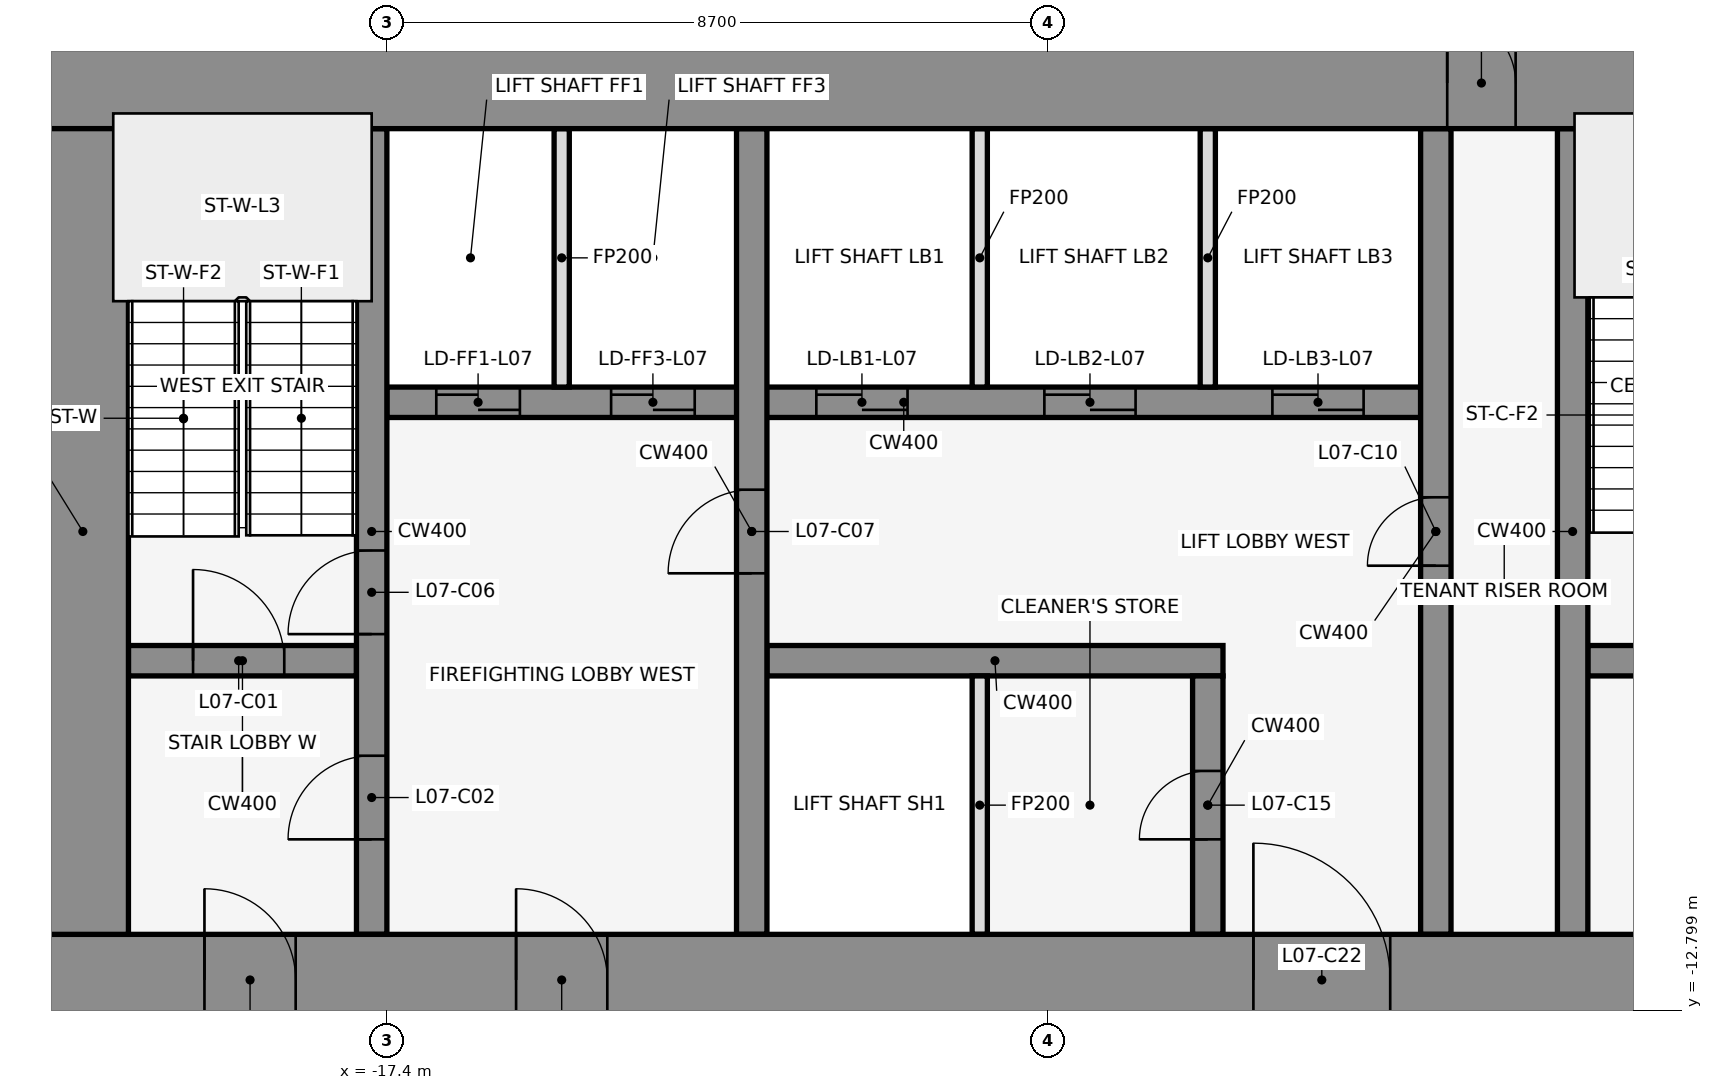
"""IFC4 building model, lengths in metres.
Left out: names, types, materials, properties, quantities, classifications, styles, units other than length and angle.
Written with IfcOpenShell. Run it as: python <this file> out.ifc"""

import sys

from ifc_helpers import new_model, si_unit, direction, frame, frame_2d, origin, place, context, subcontext, project, spatial, rectangle, extrude, element, fill, save


model = new_model("IFC4")
c1 = context("Model", 3, precision=1e-05, world=origin(), true_north=direction((0.0, 1.0)))
c2 = subcontext(c1, "Body", "Model", "MODEL_VIEW")
j1 = project(units=[si_unit("LENGTHUNIT", "METRE"), si_unit("PLANEANGLEUNIT", "RADIAN")], contexts=[c1])
p1 = place(None, origin())
s1 = spatial("IfcSite", under=j1, at=p1, CompositionType="ELEMENT")
p2 = place(p1, origin())
s2 = spatial("IfcBuilding", under=s1, at=p2, CompositionType="ELEMENT")
p3 = place(p2, frame((0.0, 0.0, 39.5)))
s3 = spatial("IfcBuildingStorey", under=s2, at=p3, CompositionType="ELEMENT", Elevation=39.5)
for number, where, z_axis, x_axis in (
    (1, (-0.068, -0.105, 0.0), (0.0, 0.0, 1.0), (-0.84, 0.543, 0.0)),
    (2, (-14.599, 1.08, 0.0), (0.0, 0.0, 1.0), (-0.84, -0.543, 0.0)),
):
    element("IfcWall", number, at=place(p3, frame(where, z_axis=z_axis, x_axis=x_axis)), inside=s3, PredefinedType="STANDARD", context=c2, shape_type="SweptSolid", body=[
        extrude(rectangle(XDim=2.183, YDim=0.25, at=frame_2d((1.091, 0.0))), origin(), (0.0, 0.0, 1.0), 4.35),
    ])
p4 = place(p3, frame((-20.8, -8.2, 0.0), z_axis=(0.0, 0.0, 1.0), x_axis=(1.0, 0.0, 0.0)))
e3 = element("IfcWall", 3, at=p4, inside=s3, PredefinedType="SHEAR", context=c2, shape_type="SweptSolid", body=[
    extrude(rectangle(XDim=3.0, YDim=0.4, at=frame_2d((1.5, 0.0))), origin(), (0.0, 0.0, 1.0), 4.5),
])
p5 = place(p4, frame((0.85, 0.0, 0.0)))
e4 = element("IfcOpeningElement", 4, at=p5, cuts=e3, PredefinedType="OPENING", context=c2, shape_type="SweptSolid", body=[
    extrude(rectangle(XDim=1.2, YDim=2.1, at=frame_2d((0.6, 1.05))), frame((0.0, 0.212, 0.0), z_axis=(0.0, -1.0, 0.0), x_axis=(1.0, 0.0, 0.0)), (0.0, 0.0, 1.0), 0.424),
])
p6 = place(p3, frame((-12.4, -8.2, 0.0), z_axis=(0.0, 0.0, 1.0), x_axis=(1.0, 0.0, 0.0)))
e5 = element("IfcWall", 5, at=p6, inside=s3, PredefinedType="SHEAR", context=c2, shape_type="SweptSolid", body=[
    extrude(rectangle(XDim=6.0, YDim=0.4, at=frame_2d((3.0, 0.0))), origin(), (0.0, 0.0, 1.0), 4.5),
])
p7 = place(p3, frame((-1.6, -8.2, 0.0), z_axis=(0.0, 0.0, 1.0), x_axis=(1.0, 0.0, 0.0)))
e6 = element("IfcWall", 6, at=p7, inside=s3, PredefinedType="SHEAR", context=c2, shape_type="SweptSolid", body=[
    extrude(rectangle(XDim=3.2, YDim=0.4, at=frame_2d((1.6, 0.0))), origin(), (0.0, 0.0, 1.0), 4.5),
])
p8 = place(p7, frame((1.05, 0.0, 0.0)))
e7 = element("IfcOpeningElement", 7, at=p8, cuts=e6, PredefinedType="OPENING", context=c2, shape_type="SweptSolid", body=[
    extrude(rectangle(XDim=1.2, YDim=2.1, at=frame_2d((0.6, 1.05))), frame((0.0, 0.212, 0.0), z_axis=(0.0, -1.0, 0.0), x_axis=(1.0, 0.0, 0.0)), (0.0, 0.0, 1.0), 0.424),
])
p9 = place(p3, frame((-17.4, -4.8, 0.0), z_axis=(0.0, 0.0, 1.0), x_axis=(1.0, 0.0, 0.0)))
e8 = element("IfcWall", 8, at=p9, inside=s3, PredefinedType="SHEAR", context=c2, shape_type="SweptSolid", body=[
    extrude(rectangle(XDim=13.6, YDim=0.4, at=frame_2d((6.8, 0.0))), origin(), (0.0, 0.0, 1.0), 4.5),
])
p10 = place(p9, frame((0.65, 0.0, 0.0)))
e9 = element("IfcOpeningElement", 9, at=p10, cuts=e8, PredefinedType="OPENING", context=c2, shape_type="SweptSolid", body=[
    extrude(rectangle(XDim=1.1, YDim=2.1, at=frame_2d((0.55, 1.05))), frame((0.0, 0.212, 0.0), z_axis=(0.0, -1.0, 0.0), x_axis=(1.0, 0.0, 0.0)), (0.0, 0.0, 1.0), 0.424),
])
p11 = place(p9, frame((2.95, 0.0, 0.0)))
e10 = element("IfcOpeningElement", 10, at=p11, cuts=e8, PredefinedType="OPENING", context=c2, shape_type="SweptSolid", body=[
    extrude(rectangle(XDim=1.1, YDim=2.1, at=frame_2d((0.55, 1.05))), frame((0.0, 0.212, 0.0), z_axis=(0.0, -1.0, 0.0), x_axis=(1.0, 0.0, 0.0)), (0.0, 0.0, 1.0), 0.424),
])
p12 = place(p9, frame((5.65, 0.0, 0.0)))
e11 = element("IfcOpeningElement", 11, at=p12, cuts=e8, PredefinedType="OPENING", context=c2, shape_type="SweptSolid", body=[
    extrude(rectangle(XDim=1.2, YDim=2.1, at=frame_2d((0.6, 1.05))), frame((0.0, 0.212, 0.0), z_axis=(0.0, -1.0, 0.0), x_axis=(1.0, 0.0, 0.0)), (0.0, 0.0, 1.0), 0.424),
])
p13 = place(p9, frame((8.65, 0.0, 0.0)))
e12 = element("IfcOpeningElement", 12, at=p13, cuts=e8, PredefinedType="OPENING", context=c2, shape_type="SweptSolid", body=[
    extrude(rectangle(XDim=1.2, YDim=2.1, at=frame_2d((0.6, 1.05))), frame((0.0, 0.212, 0.0), z_axis=(0.0, -1.0, 0.0), x_axis=(1.0, 0.0, 0.0)), (0.0, 0.0, 1.0), 0.424),
])
p14 = place(p9, frame((11.65, 0.0, 0.0)))
e13 = element("IfcOpeningElement", 13, at=p14, cuts=e8, PredefinedType="OPENING", context=c2, shape_type="SweptSolid", body=[
    extrude(rectangle(XDim=1.2, YDim=2.1, at=frame_2d((0.6, 1.05))), frame((0.0, 0.212, 0.0), z_axis=(0.0, -1.0, 0.0), x_axis=(1.0, 0.0, 0.0)), (0.0, 0.0, 1.0), 0.424),
])
p15 = place(p3, frame((-17.6, -11.8, 0.0), z_axis=(0.0, 0.0, 1.0), x_axis=(0.0, 1.0, 0.0)))
e14 = element("IfcWall", 14, at=p15, inside=s3, PredefinedType="SHEAR", context=c2, shape_type="SweptSolid", body=[
    extrude(rectangle(XDim=10.6, YDim=0.4, at=frame_2d((5.3, 0.0))), origin(), (0.0, 0.0, 1.0), 4.5),
])
p16 = place(p15, frame((1.25, 0.0, 0.0)))
e15 = element("IfcOpeningElement", 15, at=p16, cuts=e14, PredefinedType="OPENING", context=c2, shape_type="SweptSolid", body=[
    extrude(rectangle(XDim=1.1, YDim=2.1, at=frame_2d((0.55, 1.05))), frame((0.0, 0.212, 0.0), z_axis=(0.0, -1.0, 0.0), x_axis=(1.0, 0.0, 0.0)), (0.0, 0.0, 1.0), 0.424),
])
p17 = place(p15, frame((3.95, 0.0, 0.0)))
e16 = element("IfcOpeningElement", 16, at=p17, cuts=e14, PredefinedType="OPENING", context=c2, shape_type="SweptSolid", body=[
    extrude(rectangle(XDim=1.1, YDim=2.1, at=frame_2d((0.55, 1.05))), frame((0.0, 0.212, 0.0), z_axis=(0.0, -1.0, 0.0), x_axis=(1.0, 0.0, 0.0)), (0.0, 0.0, 1.0), 0.424),
])
p18 = place(p3, frame((-15.1, -4.6, 0.0), z_axis=(0.0, 0.0, 1.0), x_axis=(0.0, 1.0, 0.0)))
e17 = element("IfcWall", 17, at=p18, inside=s3, PredefinedType="PARTITIONING", context=c2, shape_type="SweptSolid", body=[
    extrude(rectangle(XDim=3.4, YDim=0.2, at=frame_2d((1.7, 0.0))), origin(), (0.0, 0.0, 1.0), 3.418),
])
p19 = place(p3, frame((-12.6, -11.8, 0.0), z_axis=(0.0, 0.0, 1.0), x_axis=(0.0, 1.0, 0.0)))
e18 = element("IfcWall", 18, at=p19, inside=s3, PredefinedType="SHEAR", context=c2, shape_type="SweptSolid", body=[
    extrude(rectangle(XDim=10.6, YDim=0.4, at=frame_2d((5.3, 0.0))), origin(), (0.0, 0.0, 1.0), 4.5),
])
p20 = place(p19, frame((4.75, 0.0, 0.0)))
e19 = element("IfcOpeningElement", 19, at=p20, cuts=e18, PredefinedType="OPENING", context=c2, shape_type="SweptSolid", body=[
    extrude(rectangle(XDim=1.1, YDim=2.1, at=frame_2d((0.55, 1.05))), frame((0.0, 0.212, 0.0), z_axis=(0.0, -1.0, 0.0), x_axis=(1.0, 0.0, 0.0)), (0.0, 0.0, 1.0), 0.424),
])
for number, where, z_axis, x_axis in (
    (20, (-9.6, -11.8, 0.0), (0.0, 0.0, 1.0), (0.0, 1.0, 0.0)),
    (21, (-9.6, -4.6, 0.0), (0.0, 0.0, 1.0), (0.0, 1.0, 0.0)),
):
    element("IfcWall", number, at=place(p3, frame(where, z_axis=z_axis, x_axis=x_axis)), inside=s3, PredefinedType="PARTITIONING", context=c2, shape_type="SweptSolid", body=[
        extrude(rectangle(XDim=3.4, YDim=0.2, at=frame_2d((1.7, 0.0))), origin(), (0.0, 0.0, 1.0), 3.418),
    ])
p21 = place(p3, frame((-6.6, -11.8, 0.0), z_axis=(0.0, 0.0, 1.0), x_axis=(0.0, 1.0, 0.0)))
e22 = element("IfcWall", 22, at=p21, inside=s3, PredefinedType="SHEAR", context=c2, shape_type="SweptSolid", body=[
    extrude(rectangle(XDim=3.4, YDim=0.4, at=frame_2d((1.7, 0.0))), origin(), (0.0, 0.0, 1.0), 4.5),
])
p22 = place(p21, frame((1.25, 0.0, 0.0)))
e23 = element("IfcOpeningElement", 23, at=p22, cuts=e22, PredefinedType="OPENING", context=c2, shape_type="SweptSolid", body=[
    extrude(rectangle(XDim=0.9, YDim=2.1, at=frame_2d((0.45, 1.05))), frame((0.0, 0.212, 0.0), z_axis=(0.0, -1.0, 0.0), x_axis=(1.0, 0.0, 0.0)), (0.0, 0.0, 1.0), 0.424),
])
p23 = place(p3, frame((-6.6, -4.6, 0.0), z_axis=(0.0, 0.0, 1.0), x_axis=(0.0, 1.0, 0.0)))
e24 = element("IfcWall", 24, at=p23, inside=s3, PredefinedType="PARTITIONING", context=c2, shape_type="SweptSolid", body=[
    extrude(rectangle(XDim=3.4, YDim=0.2, at=frame_2d((1.7, 0.0))), origin(), (0.0, 0.0, 1.0), 3.418),
])
p24 = place(p3, frame((-3.6, -11.8, 0.0), z_axis=(0.0, 0.0, 1.0), x_axis=(0.0, 1.0, 0.0)))
e25 = element("IfcWall", 25, at=p24, inside=s3, PredefinedType="SHEAR", context=c2, shape_type="SweptSolid", body=[
    extrude(rectangle(XDim=10.6, YDim=0.4, at=frame_2d((5.3, 0.0))), origin(), (0.0, 0.0, 1.0), 4.5),
])
p25 = place(p24, frame((4.85, 0.0, 0.0)))
e26 = element("IfcOpeningElement", 26, at=p25, cuts=e25, PredefinedType="OPENING", context=c2, shape_type="SweptSolid", body=[
    extrude(rectangle(XDim=0.9, YDim=2.1, at=frame_2d((0.45, 1.05))), frame((0.0, 0.212, 0.0), z_axis=(0.0, -1.0, 0.0), x_axis=(1.0, 0.0, 0.0)), (0.0, 0.0, 1.0), 0.424),
])
p26 = place(p3, frame((-1.8, -11.8, 0.0), z_axis=(0.0, 0.0, 1.0), x_axis=(0.0, 1.0, 0.0)))
e27 = element("IfcWall", 27, at=p26, inside=s3, PredefinedType="SHEAR", context=c2, shape_type="SweptSolid", body=[
    extrude(rectangle(XDim=10.6, YDim=0.4, at=frame_2d((5.3, 0.0))), origin(), (0.0, 0.0, 1.0), 4.5),
])
p27 = place(p3, frame((-22.0, -0.6, 0.0), z_axis=(0.0, 0.0, 1.0), x_axis=(1.0, 0.0, 0.0)))
e28 = element("IfcWall", 28, at=p27, inside=s3, PredefinedType="SHEAR", context=c2, shape_type="SweptSolid", body=[
    extrude(rectangle(XDim=44.0, YDim=1.2, at=frame_2d((22.0, 0.0))), origin(), (0.0, 0.0, 1.0), 4.5),
])
p28 = place(p27, frame((18.55, 0.0, 0.0)))
e29 = element("IfcOpeningElement", 29, at=p28, cuts=e28, PredefinedType="OPENING", context=c2, shape_type="SweptSolid", body=[
    extrude(rectangle(XDim=0.9, YDim=2.1, at=frame_2d((0.45, 1.05))), frame((0.0, 0.612, 0.0), z_axis=(0.0, -1.0, 0.0), x_axis=(1.0, 0.0, 0.0)), (0.0, 0.0, 1.0), 1.224),
])
p29 = place(p27, frame((24.55, 0.0, 0.0)))
e30 = element("IfcOpeningElement", 30, at=p29, cuts=e28, PredefinedType="OPENING", context=c2, shape_type="SweptSolid", body=[
    extrude(rectangle(XDim=0.9, YDim=2.1, at=frame_2d((0.45, 1.05))), frame((0.0, 0.612, 0.0), z_axis=(0.0, -1.0, 0.0), x_axis=(1.0, 0.0, 0.0)), (0.0, 0.0, 1.0), 1.224),
])
p30 = place(p3, frame((-22.0, -12.4, 0.0), z_axis=(0.0, 0.0, 1.0), x_axis=(1.0, 0.0, 0.0)))
e31 = element("IfcWall", 31, at=p30, inside=s3, PredefinedType="SHEAR", context=c2, shape_type="SweptSolid", body=[
    extrude(rectangle(XDim=44.0, YDim=1.2, at=frame_2d((22.0, 0.0))), origin(), (0.0, 0.0, 1.0), 4.5),
])
p31 = place(p30, frame((2.2, 0.0, 0.0)))
e32 = element("IfcOpeningElement", 32, at=p31, cuts=e31, PredefinedType="OPENING", context=c2, shape_type="SweptSolid", body=[
    extrude(rectangle(XDim=1.2, YDim=2.1, at=frame_2d((0.6, 1.05))), frame((0.0, 0.612, 0.0), z_axis=(0.0, -1.0, 0.0), x_axis=(1.0, 0.0, 0.0)), (0.0, 0.0, 1.0), 1.224),
])
p32 = place(p30, frame((21.4, 0.0, 0.0)))
e33 = element("IfcOpeningElement", 33, at=p32, cuts=e31, PredefinedType="OPENING", context=c2, shape_type="SweptSolid", body=[
    extrude(rectangle(XDim=1.2, YDim=2.1, at=frame_2d((0.6, 1.05))), frame((0.0, 0.612, 0.0), z_axis=(0.0, -1.0, 0.0), x_axis=(1.0, 0.0, 0.0)), (0.0, 0.0, 1.0), 1.224),
])
p33 = place(p30, frame((40.6, 0.0, 0.0)))
e34 = element("IfcOpeningElement", 34, at=p33, cuts=e31, PredefinedType="OPENING", context=c2, shape_type="SweptSolid", body=[
    extrude(rectangle(XDim=1.2, YDim=2.1, at=frame_2d((0.6, 1.05))), frame((0.0, 0.612, 0.0), z_axis=(0.0, -1.0, 0.0), x_axis=(1.0, 0.0, 0.0)), (0.0, 0.0, 1.0), 1.224),
])
p34 = place(p30, frame((16.0, 0.0, 0.0)))
e35 = element("IfcOpeningElement", 35, at=p34, cuts=e31, PredefinedType="OPENING", context=c2, shape_type="SweptSolid", body=[
    extrude(rectangle(XDim=1.8, YDim=2.1, at=frame_2d((0.9, 1.05))), frame((0.0, 0.612, 0.0), z_axis=(0.0, -1.0, 0.0), x_axis=(1.0, 0.0, 0.0)), (0.0, 0.0, 1.0), 1.224),
])
p35 = place(p30, frame((6.3, 0.0, 0.0)))
e36 = element("IfcOpeningElement", 36, at=p35, cuts=e31, PredefinedType="OPENING", context=c2, shape_type="SweptSolid", body=[
    extrude(rectangle(XDim=1.2, YDim=2.1, at=frame_2d((0.6, 1.05))), frame((0.0, 0.612, 0.0), z_axis=(0.0, -1.0, 0.0), x_axis=(1.0, 0.0, 0.0)), (0.0, 0.0, 1.0), 1.224),
])
p36 = place(p30, frame((26.2, 0.0, 0.0)))
e37 = element("IfcOpeningElement", 37, at=p36, cuts=e31, PredefinedType="OPENING", context=c2, shape_type="SweptSolid", body=[
    extrude(rectangle(XDim=1.8, YDim=2.1, at=frame_2d((0.9, 1.05))), frame((0.0, 0.612, 0.0), z_axis=(0.0, -1.0, 0.0), x_axis=(1.0, 0.0, 0.0)), (0.0, 0.0, 1.0), 1.224),
])
p37 = place(p30, frame((36.5, 0.0, 0.0)))
e38 = element("IfcOpeningElement", 38, at=p37, cuts=e31, PredefinedType="OPENING", context=c2, shape_type="SweptSolid", body=[
    extrude(rectangle(XDim=1.2, YDim=2.1, at=frame_2d((0.6, 1.05))), frame((0.0, 0.612, 0.0), z_axis=(0.0, -1.0, 0.0), x_axis=(1.0, 0.0, 0.0)), (0.0, 0.0, 1.0), 1.224),
])
p38 = place(p3, frame((-21.4, -11.8, 0.0), z_axis=(0.0, 0.0, 1.0), x_axis=(0.0, 1.0, 0.0)))
e39 = element("IfcWall", 39, at=p38, inside=s3, PredefinedType="SHEAR", context=c2, shape_type="SweptSolid", body=[
    extrude(rectangle(XDim=10.6, YDim=1.2, at=frame_2d((5.3, 0.0))), origin(), (0.0, 0.0, 1.0), 4.5),
])
p39 = place(p5, origin())
e40 = element("IfcDoor", 40, at=p39, inside=s3, OperationType="SINGLE_SWING_LEFT", PredefinedType="DOOR", context=c2, shape_type="SweptSolid", body=[
    extrude(rectangle(XDim=1.2, YDim=2.1, at=frame_2d((0.6, 1.05))), frame((0.0, 0.025, 0.0), z_axis=(0.0, -1.0, 0.0), x_axis=(1.0, 0.0, 0.0)), (0.0, 0.0, 1.0), 0.05),
])
fill(e4, e40)
p40 = place(p16, frame((1.1, 0.0, 0.0), z_axis=(0.0, 0.0, 1.0), x_axis=(-1.0, 0.0, 0.0)))
e41 = element("IfcDoor", 41, at=p40, inside=s3, OperationType="SINGLE_SWING_LEFT", PredefinedType="DOOR", context=c2, shape_type="SweptSolid", body=[
    extrude(rectangle(XDim=1.1, YDim=2.1, at=frame_2d((0.55, 1.05))), frame((0.0, 0.025, 0.0), z_axis=(0.0, -1.0, 0.0), x_axis=(1.0, 0.0, 0.0)), (0.0, 0.0, 1.0), 0.05),
])
fill(e15, e41)
p41 = place(p10, origin())
e42 = element("IfcDoor", 42, at=p41, inside=s3, OperationType="DOUBLE_DOOR_SLIDING", PredefinedType="DOOR", context=c2, shape_type="SweptSolid", body=[
    extrude(rectangle(XDim=1.1, YDim=2.1, at=frame_2d((0.55, 1.05))), frame((0.0, 0.025, 0.0), z_axis=(0.0, -1.0, 0.0), x_axis=(1.0, 0.0, 0.0)), (0.0, 0.0, 1.0), 0.05),
])
fill(e9, e42)
p42 = place(p11, origin())
e43 = element("IfcDoor", 43, at=p42, inside=s3, OperationType="DOUBLE_DOOR_SLIDING", PredefinedType="DOOR", context=c2, shape_type="SweptSolid", body=[
    extrude(rectangle(XDim=1.1, YDim=2.1, at=frame_2d((0.55, 1.05))), frame((0.0, 0.025, 0.0), z_axis=(0.0, -1.0, 0.0), x_axis=(1.0, 0.0, 0.0)), (0.0, 0.0, 1.0), 0.05),
])
fill(e10, e43)
p43 = place(p12, origin())
e44 = element("IfcDoor", 44, at=p43, inside=s3, OperationType="DOUBLE_DOOR_SLIDING", PredefinedType="DOOR", context=c2, shape_type="SweptSolid", body=[
    extrude(rectangle(XDim=1.2, YDim=2.1, at=frame_2d((0.6, 1.05))), frame((0.0, 0.025, 0.0), z_axis=(0.0, -1.0, 0.0), x_axis=(1.0, 0.0, 0.0)), (0.0, 0.0, 1.0), 0.05),
])
fill(e11, e44)
p44 = place(p13, origin())
e45 = element("IfcDoor", 45, at=p44, inside=s3, OperationType="DOUBLE_DOOR_SLIDING", PredefinedType="DOOR", context=c2, shape_type="SweptSolid", body=[
    extrude(rectangle(XDim=1.2, YDim=2.1, at=frame_2d((0.6, 1.05))), frame((0.0, 0.025, 0.0), z_axis=(0.0, -1.0, 0.0), x_axis=(1.0, 0.0, 0.0)), (0.0, 0.0, 1.0), 0.05),
])
fill(e12, e45)
p45 = place(p14, origin())
e46 = element("IfcDoor", 46, at=p45, inside=s3, OperationType="DOUBLE_DOOR_SLIDING", PredefinedType="DOOR", context=c2, shape_type="SweptSolid", body=[
    extrude(rectangle(XDim=1.2, YDim=2.1, at=frame_2d((0.6, 1.05))), frame((0.0, 0.025, 0.0), z_axis=(0.0, -1.0, 0.0), x_axis=(1.0, 0.0, 0.0)), (0.0, 0.0, 1.0), 0.05),
])
fill(e13, e46)
p46 = place(p17, frame((1.1, 0.0, 0.0), z_axis=(0.0, 0.0, 1.0), x_axis=(-1.0, 0.0, 0.0)))
e47 = element("IfcDoor", 47, at=p46, inside=s3, OperationType="SINGLE_SWING_LEFT", PredefinedType="DOOR", context=c2, shape_type="SweptSolid", body=[
    extrude(rectangle(XDim=1.1, YDim=2.1, at=frame_2d((0.55, 1.05))), frame((0.0, 0.025, 0.0), z_axis=(0.0, -1.0, 0.0), x_axis=(1.0, 0.0, 0.0)), (0.0, 0.0, 1.0), 0.05),
])
fill(e16, e47)
p47 = place(p20, origin())
e48 = element("IfcDoor", 48, at=p47, inside=s3, OperationType="SINGLE_SWING_LEFT", PredefinedType="DOOR", context=c2, shape_type="SweptSolid", body=[
    extrude(rectangle(XDim=1.1, YDim=2.1, at=frame_2d((0.55, 1.05))), frame((0.0, 0.025, 0.0), z_axis=(0.0, -1.0, 0.0), x_axis=(1.0, 0.0, 0.0)), (0.0, 0.0, 1.0), 0.05),
])
fill(e19, e48)
p48 = place(p25, frame((0.9, 0.0, 0.0), z_axis=(0.0, 0.0, 1.0), x_axis=(-1.0, 0.0, 0.0)))
e49 = element("IfcDoor", 49, at=p48, inside=s3, OperationType="SINGLE_SWING_LEFT", PredefinedType="DOOR", context=c2, shape_type="SweptSolid", body=[
    extrude(rectangle(XDim=0.9, YDim=2.1, at=frame_2d((0.45, 1.05))), frame((0.0, 0.025, 0.0), z_axis=(0.0, -1.0, 0.0), x_axis=(1.0, 0.0, 0.0)), (0.0, 0.0, 1.0), 0.05),
])
fill(e26, e49)
p49 = place(p22, origin())
e50 = element("IfcDoor", 50, at=p49, inside=s3, OperationType="SINGLE_SWING_LEFT", PredefinedType="DOOR", context=c2, shape_type="SweptSolid", body=[
    extrude(rectangle(XDim=0.9, YDim=2.1, at=frame_2d((0.45, 1.05))), frame((0.0, 0.025, 0.0), z_axis=(0.0, -1.0, 0.0), x_axis=(1.0, 0.0, 0.0)), (0.0, 0.0, 1.0), 0.05),
])
fill(e23, e50)
p50 = place(p28, origin())
e51 = element("IfcDoor", 51, at=p50, inside=s3, OperationType="SINGLE_SWING_LEFT", PredefinedType="DOOR", context=c2, shape_type="SweptSolid", body=[
    extrude(rectangle(XDim=0.9, YDim=2.1, at=frame_2d((0.45, 1.05))), frame((0.0, 0.025, 0.0), z_axis=(0.0, -1.0, 0.0), x_axis=(1.0, 0.0, 0.0)), (0.0, 0.0, 1.0), 0.05),
])
fill(e29, e51)
p51 = place(p31, frame((1.2, 0.0, 0.0), z_axis=(0.0, 0.0, 1.0), x_axis=(-1.0, 0.0, 0.0)))
e52 = element("IfcDoor", 52, at=p51, inside=s3, OperationType="SINGLE_SWING_RIGHT", PredefinedType="DOOR", context=c2, shape_type="SweptSolid", body=[
    extrude(rectangle(XDim=1.2, YDim=2.1, at=frame_2d((0.6, 1.05))), frame((0.0, 0.025, 0.0), z_axis=(0.0, -1.0, 0.0), x_axis=(1.0, 0.0, 0.0)), (0.0, 0.0, 1.0), 0.05),
])
fill(e32, e52)
p52 = place(p34, origin())
e53 = element("IfcDoor", 53, at=p52, inside=s3, OperationType="SINGLE_SWING_LEFT", PredefinedType="DOOR", context=c2, shape_type="SweptSolid", body=[
    extrude(rectangle(XDim=1.8, YDim=2.1, at=frame_2d((0.9, 1.05))), frame((0.0, 0.025, 0.0), z_axis=(0.0, -1.0, 0.0), x_axis=(1.0, 0.0, 0.0)), (0.0, 0.0, 1.0), 0.05),
])
fill(e35, e53)
p53 = place(p35, frame((1.2, 0.0, 0.0), z_axis=(0.0, 0.0, 1.0), x_axis=(-1.0, 0.0, 0.0)))
e54 = element("IfcDoor", 54, at=p53, inside=s3, OperationType="SINGLE_SWING_RIGHT", PredefinedType="DOOR", context=c2, shape_type="SweptSolid", body=[
    extrude(rectangle(XDim=1.2, YDim=2.1, at=frame_2d((0.6, 1.05))), frame((0.0, 0.025, 0.0), z_axis=(0.0, -1.0, 0.0), x_axis=(1.0, 0.0, 0.0)), (0.0, 0.0, 1.0), 0.05),
])
fill(e36, e54)
save(model, sys.argv[1])
